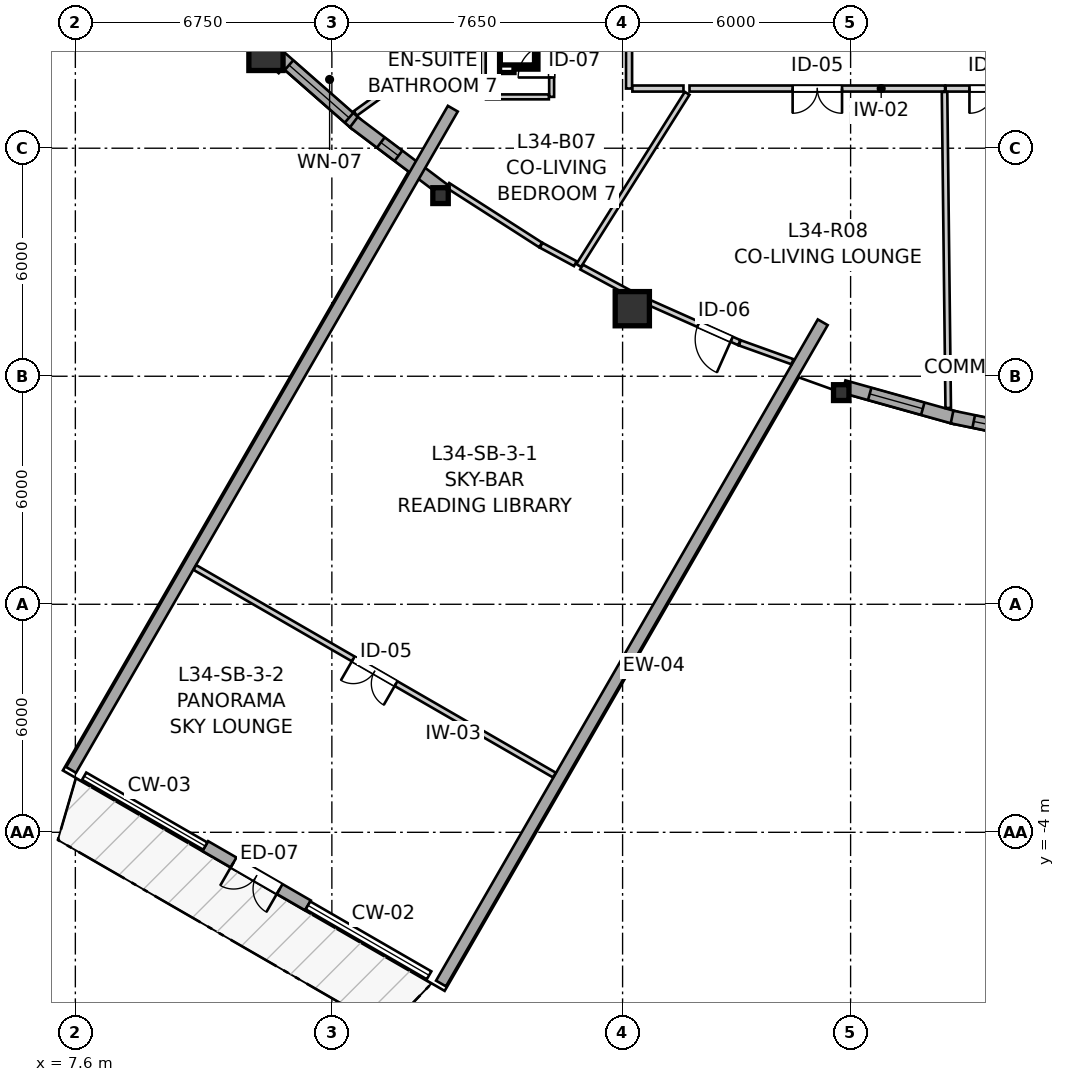
"""IFC4 building model, lengths in metres.
Left out: names, types, materials, properties, quantities, classifications, styles, units other than length and angle.
Written with IfcOpenShell. Run it as: python <this file> out.ifc"""

import sys

from ifc_helpers import new_model, si_unit, direction, frame, frame_2d, origin, origin_2d, place, context, subcontext, project, spatial, rectangle, i_section, extrude, source, transform, mapped, element, fill, save


model = new_model("IFC4")
c1 = context("Model", 3, precision=1e-05, world=origin(), true_north=direction((0.0, 1.0)))
c2 = subcontext(c1, "Body", "Model", "MODEL_VIEW")
j1 = project(units=[si_unit("LENGTHUNIT", "METRE"), si_unit("PLANEANGLEUNIT", "RADIAN")], contexts=[c1])
p1 = place(None, origin())
s1 = spatial("IfcSite", under=j1, at=p1, CompositionType="ELEMENT")
p2 = place(p1, origin())
s2 = spatial("IfcBuilding", under=s1, at=p2, CompositionType="ELEMENT")
p3 = place(p2, frame((0.0, 0.0, 115.2)))
s3 = spatial("IfcBuildingStorey", under=s2, at=p3, CompositionType="ELEMENT", Elevation=115.2)
m1 = source(origin(), c2, "Body", "SweptSolid", [
    extrude(rectangle(XDim=0.9, YDim=0.9, at=origin_2d()), origin(), (0.0, 0.0, 1.0), 2.95),
])
p4 = place(p3, frame((12.616, 16.495, 0.0), z_axis=(0.0, 0.0, 1.0), x_axis=(1.0, 0.0, 0.0)))
e1 = element("IfcColumn", 1, at=p4, inside=s3, PredefinedType="COLUMN", context=c2, shape_type="MappedRepresentation", body=[
    mapped(m1, transform((0.0, 0.0, 0.0), x_axis=(1.0, 0.0, 0.0), y_axis=(0.0, 1.0, 0.0), z_axis=(0.0, 0.0, 1.0), scale=1.0)),
])
m2 = source(origin(), c2, "Body", "SweptSolid", [
    extrude(i_section(OverallWidth=0.406, OverallDepth=0.416, WebThickness=0.027, FlangeThickness=0.044, FilletRadius=0.015, at=origin_2d()), origin(), (0.0, 0.0, 1.0), 2.95),
])
p5 = place(p3, frame((17.209, 12.753, 0.0), z_axis=(0.0, 0.0, 1.0), x_axis=(1.0, 0.0, 0.0)))
e2 = element("IfcColumn", 2, at=p5, inside=s3, PredefinedType="PILASTER", context=c2, shape_type="MappedRepresentation", body=[
    mapped(m2, transform((0.0, 0.0, 0.0), x_axis=(1.0, 0.0, 0.0), y_axis=(0.0, 1.0, 0.0), z_axis=(0.0, 0.0, 1.0), scale=1.0)),
])
p6 = place(p3, frame((22.256, 9.778, 0.0), z_axis=(0.0, 0.0, 1.0), x_axis=(1.0, 0.0, 0.0)))
e3 = element("IfcColumn", 3, at=p6, inside=s3, PredefinedType="COLUMN", context=c2, shape_type="MappedRepresentation", body=[
    mapped(m1, transform((0.0, 0.0, 0.0), x_axis=(1.0, 0.0, 0.0), y_axis=(0.0, 1.0, 0.0), z_axis=(0.0, 0.0, 1.0), scale=1.0)),
])
p7 = place(p3, frame((27.754, 7.569, 0.0), z_axis=(0.0, 0.0, 1.0), x_axis=(1.0, 0.0, 0.0)))
e4 = element("IfcColumn", 4, at=p7, inside=s3, PredefinedType="PILASTER", context=c2, shape_type="MappedRepresentation", body=[
    mapped(m2, transform((0.0, 0.0, 0.0), x_axis=(1.0, 0.0, 0.0), y_axis=(0.0, 1.0, 0.0), z_axis=(0.0, 0.0, 1.0), scale=1.0)),
])
p8 = place(p3, frame((12.901, 16.471, 0.0), z_axis=(0.0, 0.0, 1.0), x_axis=(0.751480442913, -0.659755366722, 0.0)))
e5 = element("IfcWall", 5, at=p8, inside=s3, PredefinedType="SOLIDWALL", context=c2, shape_type="SweptSolid", body=[
    extrude(rectangle(XDim=2.789, YDim=0.34, at=frame_2d((1.395, 0.0))), origin(), (0.0, 0.0, 1.0), 2.48),
])
p9 = place(p8, frame((0.43, 0.0, 0.82)))
e6 = element("IfcOpeningElement", 6, at=p9, cuts=e5, PredefinedType="OPENING", context=c2, shape_type="SweptSolid", body=[
    extrude(rectangle(XDim=2.1, YDim=1.4, at=frame_2d((1.05, 0.7))), frame((0.0, 0.18, 0.0), z_axis=(0.0, -1.0, 0.0), x_axis=(1.0, 0.0, 0.0)), (0.0, 0.0, 1.0), 0.36),
])
p10 = place(p3, frame((14.928, 14.686, 0.0), z_axis=(0.0, 0.0, 1.0), x_axis=(0.798387010211, -0.602144651995, 0.0)))
e7 = element("IfcWall", 7, at=p10, inside=s3, PredefinedType="SOLIDWALL", context=c2, shape_type="SweptSolid", body=[
    extrude(rectangle(XDim=2.966, YDim=0.34, at=frame_2d((1.483, 0.0))), origin(), (0.0, 0.0, 1.0), 2.48),
])
p11 = place(p10, frame((0.891, 0.0, 0.82)))
e8 = element("IfcOpeningElement", 8, at=p11, cuts=e7, PredefinedType="OPENING", context=c2, shape_type="SweptSolid", body=[
    extrude(rectangle(XDim=0.58, YDim=1.35, at=frame_2d((0.29, 0.675))), frame((0.0, 0.18, 0.0), z_axis=(0.0, -1.0, 0.0), x_axis=(1.0, 0.0, 0.0)), (0.0, 0.0, 1.0), 0.36),
])
p12 = place(p3, frame((27.819, 7.728, 0.0), z_axis=(0.0, 0.0, 1.0), x_axis=(0.963032186905, -0.269386352632, 0.0)))
e9 = element("IfcWall", 9, at=p12, inside=s3, PredefinedType="SOLIDWALL", context=c2, shape_type="SweptSolid", body=[
    extrude(rectangle(XDim=3.049, YDim=0.34, at=frame_2d((1.524, 0.0))), origin(), (0.0, 0.0, 1.0), 2.48),
])
p13 = place(p12, frame((0.71, 0.0, 0.82)))
e10 = element("IfcOpeningElement", 10, at=p13, cuts=e9, PredefinedType="OPENING", context=c2, shape_type="SweptSolid", body=[
    extrude(rectangle(XDim=1.45, YDim=1.25, at=frame_2d((0.725, 0.625))), frame((0.0, 0.18, 0.0), z_axis=(0.0, -1.0, 0.0), x_axis=(1.0, 0.0, 0.0)), (0.0, 0.0, 1.0), 0.36),
])
p14 = place(p3, frame((30.67, 6.927, 0.0), z_axis=(0.0, 0.0, 1.0), x_axis=(0.979422345081, -0.201821381317, 0.0)))
e11 = element("IfcWall", 11, at=p14, inside=s3, PredefinedType="SOLIDWALL", context=c2, shape_type="SweptSolid", body=[
    extrude(rectangle(XDim=2.903, YDim=0.34, at=frame_2d((1.452, 0.0))), origin(), (0.0, 0.0, 1.0), 2.48),
])
p15 = place(p14, frame((0.582, 0.0, 0.82)))
e12 = element("IfcOpeningElement", 12, at=p15, cuts=e11, PredefinedType="OPENING", context=c2, shape_type="SweptSolid", body=[
    extrude(rectangle(XDim=1.75, YDim=1.3, at=frame_2d((0.875, 0.65))), frame((0.0, 0.18, 0.0), z_axis=(0.0, -1.0, 0.0), x_axis=(1.0, 0.0, 0.0)), (0.0, 0.0, 1.0), 0.36),
])
p16 = place(p3, frame((27.267, 9.42, 0.0), z_axis=(0.0, 0.0, 1.0), x_axis=(-0.500001212782, -0.866024703583, 0.0)))
e13 = element("IfcWall", 13, at=p16, inside=s3, PredefinedType="SOLIDWALL", context=c2, shape_type="SweptSolid", body=[
    extrude(rectangle(XDim=20.09, YDim=0.3, at=frame_2d((10.045, 0.0))), origin(), (0.0, 0.0, 1.0), 2.13),
])
p17 = place(p3, frame((17.533, 15.04, 0.0), z_axis=(0.0, 0.0, 1.0), x_axis=(-0.499995950774, -0.866027741594, 0.0)))
e14 = element("IfcWall", 14, at=p17, inside=s3, PredefinedType="SOLIDWALL", context=c2, shape_type="SweptSolid", body=[
    extrude(rectangle(XDim=20.091, YDim=0.3, at=frame_2d((10.045, 0.0))), origin(), (0.0, 0.0, 1.0), 2.13),
])
p18 = place(p3, frame((13.721, -5.923, 0.0), z_axis=(0.0, 0.0, 1.0), x_axis=(-0.866009661879, 0.500027264788, 0.0)))
e15 = element("IfcWall", 15, at=p18, inside=s3, PredefinedType="SOLIDWALL", context=c2, shape_type="SweptSolid", body=[
    extrude(rectangle(XDim=3.12, YDim=0.3, at=frame_2d((1.56, 0.0))), origin(), (0.0, 0.0, 1.0), 2.3),
])
p19 = place(p18, frame((0.86, 0.0, 0.0)))
e16 = element("IfcOpeningElement", 16, at=p19, cuts=e15, PredefinedType="OPENING", context=c2, shape_type="SweptSolid", body=[
    extrude(rectangle(XDim=1.4, YDim=2.15, at=frame_2d((0.7, 1.075))), frame((0.0, 0.16, 0.0), z_axis=(0.0, -1.0, 0.0), x_axis=(1.0, 0.0, 0.0)), (0.0, 0.0, 1.0), 0.32),
])
p20 = place(p3, frame((20.206, -2.494, 0.0), z_axis=(0.0, 0.0, 1.0), x_axis=(-0.866034115916, 0.499984909842, 0.0)))
e17 = element("IfcWall", 17, at=p20, inside=s3, PredefinedType="PARTITIONING", context=c2, shape_type="SweptSolid", body=[
    extrude(rectangle(XDim=10.924, YDim=0.145, at=frame_2d((5.462, 0.0))), origin(), (0.0, 0.0, 1.0), 2.383),
])
p21 = place(p20, frame((4.812, 0.0, 0.0)))
e18 = element("IfcOpeningElement", 18, at=p21, cuts=e17, PredefinedType="OPENING", context=c2, shape_type="SweptSolid", body=[
    extrude(rectangle(XDim=1.3, YDim=2.1, at=frame_2d((0.65, 1.05))), frame((0.0, 0.083, 0.0), z_axis=(0.0, -1.0, 0.0), x_axis=(1.0, 0.0, 0.0)), (0.0, 0.0, 1.0), 0.165),
])
p22 = place(p3, frame((30.486, 15.57, 0.0), z_axis=(0.0, 0.0, 1.0), x_axis=(-1.0, 0.0, 0.0)))
e19 = element("IfcWall", 19, at=p22, inside=s3, PredefinedType="PARTITIONING", context=c2, shape_type="SweptSolid", body=[
    extrude(rectangle(XDim=6.725, YDim=0.16, at=frame_2d((3.363, 0.0))), origin(), (0.0, 0.0, 1.0), 2.95),
])
p23 = place(p22, frame((2.711, 0.0, 0.0)))
e20 = element("IfcOpeningElement", 20, at=p23, cuts=e19, PredefinedType="OPENING", context=c2, shape_type="SweptSolid", body=[
    extrude(rectangle(XDim=1.3, YDim=2.1, at=frame_2d((0.65, 1.05))), frame((0.0, 0.09, 0.0), z_axis=(0.0, -1.0, 0.0), x_axis=(1.0, 0.0, 0.0)), (0.0, 0.0, 1.0), 0.18),
])
p24 = place(p3, frame((22.17, 15.57, 0.0), z_axis=(0.0, 0.0, 1.0), x_axis=(0.0, 1.0, 0.0)))
e21 = element("IfcWall", 21, at=p24, inside=s3, PredefinedType="PARTITIONING", context=c2, shape_type="SweptSolid", body=[
    extrude(rectangle(XDim=4.555, YDim=0.16, at=frame_2d((2.277, 0.0))), origin(), (0.0, 0.0, 1.0), 2.95),
])
p25 = place(p24, frame((1.808, 0.0, 0.0)))
e22 = element("IfcOpeningElement", 22, at=p25, cuts=e21, PredefinedType="OPENING", context=c2, shape_type="SweptSolid", body=[
    extrude(rectangle(XDim=0.92, YDim=2.1, at=frame_2d((0.46, 1.05))), frame((0.0, 0.09, 0.0), z_axis=(0.0, -1.0, 0.0), x_axis=(1.0, 0.0, 0.0)), (0.0, 0.0, 1.0), 0.18),
])
p26 = place(p3, frame((25.071, 8.884, 0.0), z_axis=(0.0, 0.0, 1.0), x_axis=(-0.913404708383, 0.407052623997, 0.0)))
e23 = element("IfcWall", 23, at=p26, inside=s3, PredefinedType="PARTITIONING", context=c2, shape_type="SweptSolid", body=[
    extrude(rectangle(XDim=2.923, YDim=0.145, at=frame_2d((1.462, 0.0))), origin(), (0.0, 0.0, 1.0), 2.468),
])
p27 = place(p26, frame((0.22, 0.0, 0.0)))
e24 = element("IfcOpeningElement", 24, at=p27, cuts=e23, PredefinedType="OPENING", context=c2, shape_type="SweptSolid", body=[
    extrude(rectangle(XDim=0.96, YDim=2.1, at=frame_2d((0.48, 1.05))), frame((0.0, 0.083, 0.0), z_axis=(0.0, -1.0, 0.0), x_axis=(1.0, 0.0, 0.0)), (0.0, 0.0, 1.0), 0.165),
])
p28 = place(p3, frame((33.099, 15.57, 0.0), z_axis=(0.0, 0.0, 1.0), x_axis=(-1.0, 0.0, 0.0)))
e25 = element("IfcWall", 25, at=p28, inside=s3, PredefinedType="PARTITIONING", context=c2, shape_type="SweptSolid", body=[
    extrude(rectangle(XDim=2.598, YDim=0.16, at=frame_2d((1.299, 0.0))), origin(), (0.0, 0.0, 1.0), 2.95),
])
p29 = place(p28, frame((0.671, 0.0, 0.0)))
e26 = element("IfcOpeningElement", 26, at=p29, cuts=e25, PredefinedType="OPENING", context=c2, shape_type="SweptSolid", body=[
    extrude(rectangle(XDim=1.3, YDim=2.1, at=frame_2d((0.65, 1.05))), frame((0.0, 0.09, 0.0), z_axis=(0.0, -1.0, 0.0), x_axis=(1.0, 0.0, 0.0)), (0.0, 0.0, 1.0), 0.18),
])
p30 = place(p3, frame((20.133, 15.351, 0.0), z_axis=(0.0, 0.0, 1.0), x_axis=(0.0, 1.0, 0.0)))
e27 = element("IfcWall", 27, at=p30, inside=s3, PredefinedType="PARTITIONING", context=c2, shape_type="SweptSolid", body=[
    extrude(rectangle(XDim=1.9, YDim=0.13, at=frame_2d((0.95, 0.0))), origin(), (0.0, 0.0, 1.0), 2.95),
])
p31 = place(p30, frame((0.51, 0.0, 0.0)))
e28 = element("IfcOpeningElement", 28, at=p31, cuts=e27, PredefinedType="OPENING", context=c2, shape_type="SweptSolid", body=[
    extrude(rectangle(XDim=0.88, YDim=2.05, at=frame_2d((0.44, 1.025))), frame((0.0, 0.075, 0.0), z_axis=(0.0, -1.0, 0.0), x_axis=(1.0, 0.0, 0.0)), (0.0, 0.0, 1.0), 0.15),
])
p32 = place(p3, frame((14.966, 14.915, 0.0), z_axis=(0.0, 0.0, 1.0), x_axis=(0.811310715309, 0.584615192434, 0.0)))
e29 = element("IfcWall", 29, at=p32, inside=s3, PredefinedType="PARTITIONING", context=c2, shape_type="SweptSolid", body=[
    extrude(rectangle(XDim=8.72, YDim=0.145, at=frame_2d((4.36, 0.0))), origin(), (0.0, 0.0, 1.0), 2.118),
])
p33 = place(p3, frame((30.472, 15.481, 0.0), z_axis=(0.0, 0.0, 1.0), x_axis=(0.011623708307, -0.999932442421, 0.0)))
e30 = element("IfcWall", 30, at=p33, inside=s3, PredefinedType="PARTITIONING", context=c2, shape_type="SweptSolid", body=[
    extrude(rectangle(XDim=8.317, YDim=0.145, at=frame_2d((4.159, 0.0))), origin(), (0.0, 0.0, 1.0), 2.95),
])
p34 = place(p3, frame((20.845, 10.914, 0.0), z_axis=(0.0, 0.0, 1.0), x_axis=(0.533007953382, 0.846110230189, 0.0)))
e31 = element("IfcWall", 31, at=p34, inside=s3, PredefinedType="PARTITIONING", context=c2, shape_type="SweptSolid", body=[
    extrude(rectangle(XDim=5.354, YDim=0.145, at=frame_2d((2.677, 0.0))), origin(), (0.0, 0.0, 1.0), 2.95),
])
p35 = place(p3, frame((17.398, 13.024, 0.0), z_axis=(0.0, 0.0, 1.0), x_axis=(0.841590343852, -0.540116369994, 0.0)))
e32 = element("IfcWall", 32, at=p35, inside=s3, PredefinedType="PARTITIONING", context=c2, shape_type="SweptSolid", body=[
    extrude(rectangle(XDim=2.906, YDim=0.145, at=frame_2d((1.453, 0.0))), origin(), (0.0, 0.0, 1.0), 2.468),
])
p36 = place(p3, frame((18.333, 15.351, 0.0), z_axis=(0.0, 0.0, 1.0), x_axis=(0.0, 1.0, 0.0)))
e33 = element("IfcWall", 33, at=p36, inside=s3, PredefinedType="PARTITIONING", context=c2, shape_type="SweptSolid", body=[
    extrude(rectangle(XDim=1.756, YDim=0.13, at=frame_2d((0.878, 0.0))), origin(), (0.0, 0.0, 1.0), 2.95),
])
p37 = place(p3, frame((18.406, 15.351, 0.0), z_axis=(0.0, 0.0, 1.0), x_axis=(1.0, 0.0, 0.0)))
e34 = element("IfcWall", 34, at=p37, inside=s3, PredefinedType="PARTITIONING", context=c2, shape_type="SweptSolid", body=[
    extrude(rectangle(XDim=1.654, YDim=0.13, at=frame_2d((0.827, 0.0))), origin(), (0.0, 0.0, 1.0), 2.95),
])
p38 = place(p3, frame((20.92, 10.873, 0.0), z_axis=(0.0, 0.0, 1.0), x_axis=(0.879929881444, -0.475103571595, 0.0)))
e35 = element("IfcWall", 35, at=p38, inside=s3, PredefinedType="PARTITIONING", context=c2, shape_type="SweptSolid", body=[
    extrude(rectangle(XDim=1.667, YDim=0.145, at=frame_2d((0.834, 0.0))), origin(), (0.0, 0.0, 1.0), 2.468),
])
p39 = place(p3, frame((22.258, 15.57, 0.0), z_axis=(0.0, 0.0, 1.0), x_axis=(1.0, 0.0, 0.0)))
e36 = element("IfcWall", 36, at=p39, inside=s3, PredefinedType="PARTITIONING", context=c2, shape_type="SweptSolid", body=[
    extrude(rectangle(XDim=1.344, YDim=0.16, at=frame_2d((0.672, 0.0))), origin(), (0.0, 0.0, 1.0), 2.95),
])
p40 = place(p3, frame((25.085, 8.879, 0.0), z_axis=(0.0, 0.0, 1.0), x_axis=(0.941166260093, -0.337943887151, 0.0)))
e37 = element("IfcWall", 37, at=p40, inside=s3, PredefinedType="PARTITIONING", context=c2, shape_type="SweptSolid", body=[
    extrude(rectangle(XDim=1.472, YDim=0.145, at=frame_2d((0.736, 0.0))), origin(), (0.0, 0.0, 1.0), 2.468),
])
p41 = place(p3, frame((19.857, 11.447, 0.0), z_axis=(0.0, 0.0, 1.0), x_axis=(0.8800411893, -0.474897362738, 0.0)))
e38 = element("IfcWall", 38, at=p41, inside=s3, PredefinedType="PARTITIONING", context=c2, shape_type="SweptSolid", body=[
    extrude(rectangle(XDim=1.022, YDim=0.145, at=frame_2d((0.511, 0.0))), origin(), (0.0, 0.0, 1.0), 2.468),
])
m3 = source(origin(), c2, "Body", "SweptSolid", [
    extrude(rectangle(XDim=2.1, YDim=1.4, at=frame_2d((1.05, 0.7))), frame((0.0, 0.03, 0.0), z_axis=(0.0, -1.0, 0.0), x_axis=(1.0, 0.0, 0.0)), (0.0, 0.0, 1.0), 0.06),
])
p42 = place(p9, origin())
e39 = element("IfcWindow", 39, at=p42, inside=s3, PartitioningType="SINGLE_PANEL", PredefinedType="WINDOW", context=c2, shape_type="MappedRepresentation", body=[
    mapped(m3, transform((0.0, 0.0, 0.0), x_axis=(1.0, 0.0, 0.0), y_axis=(0.0, 1.0, 0.0), z_axis=(0.0, 0.0, 1.0), scale=1.0)),
])
fill(e6, e39)
m4 = source(origin(), c2, "Body", "SweptSolid", [
    extrude(rectangle(XDim=1.45, YDim=1.25, at=frame_2d((0.725, 0.625))), frame((0.0, 0.03, 0.0), z_axis=(0.0, -1.0, 0.0), x_axis=(1.0, 0.0, 0.0)), (0.0, 0.0, 1.0), 0.06),
])
p43 = place(p13, origin())
e40 = element("IfcWindow", 40, at=p43, inside=s3, PartitioningType="SINGLE_PANEL", PredefinedType="WINDOW", context=c2, shape_type="MappedRepresentation", body=[
    mapped(m4, transform((0.0, 0.0, 0.0), x_axis=(1.0, 0.0, 0.0), y_axis=(0.0, 1.0, 0.0), z_axis=(0.0, 0.0, 1.0), scale=1.0)),
])
fill(e10, e40)
m5 = source(origin(), c2, "Body", "SweptSolid", [
    extrude(rectangle(XDim=1.75, YDim=1.3, at=frame_2d((0.875, 0.65))), frame((0.0, 0.03, 0.0), z_axis=(0.0, -1.0, 0.0), x_axis=(1.0, 0.0, 0.0)), (0.0, 0.0, 1.0), 0.06),
])
p44 = place(p15, origin())
e41 = element("IfcWindow", 41, at=p44, inside=s3, PartitioningType="SINGLE_PANEL", PredefinedType="WINDOW", context=c2, shape_type="MappedRepresentation", body=[
    mapped(m5, transform((0.0, 0.0, 0.0), x_axis=(1.0, 0.0, 0.0), y_axis=(0.0, 1.0, 0.0), z_axis=(0.0, 0.0, 1.0), scale=1.0)),
])
fill(e12, e41)
m6 = source(origin(), c2, "Body", "SweptSolid", [
    extrude(rectangle(XDim=0.58, YDim=1.35, at=frame_2d((0.29, 0.675))), frame((0.0, 0.03, 0.0), z_axis=(0.0, -1.0, 0.0), x_axis=(1.0, 0.0, 0.0)), (0.0, 0.0, 1.0), 0.06),
])
p45 = place(p11, origin())
e42 = element("IfcWindow", 42, at=p45, inside=s3, PartitioningType="SINGLE_PANEL", PredefinedType="WINDOW", context=c2, shape_type="MappedRepresentation", body=[
    mapped(m6, transform((0.0, 0.0, 0.0), x_axis=(1.0, 0.0, 0.0), y_axis=(0.0, 1.0, 0.0), z_axis=(0.0, 0.0, 1.0), scale=1.0)),
])
fill(e8, e42)
m7 = source(origin(), c2, "Body", "SweptSolid", [
    extrude(rectangle(XDim=1.4, YDim=2.15, at=frame_2d((0.7, 1.075))), frame((0.0, 0.025, 0.0), z_axis=(0.0, -1.0, 0.0), x_axis=(1.0, 0.0, 0.0)), (0.0, 0.0, 1.0), 0.05),
])
p46 = place(p19, origin())
e43 = element("IfcDoor", 43, at=p46, inside=s3, OperationType="DOUBLE_DOOR_SINGLE_SWING", PredefinedType="DOOR", context=c2, shape_type="MappedRepresentation", body=[
    mapped(m7, transform((0.0, 0.0, 0.0), x_axis=(1.0, 0.0, 0.0), y_axis=(0.0, 1.0, 0.0), z_axis=(0.0, 0.0, 1.0), scale=1.0)),
])
fill(e16, e43)
m8 = source(origin(), c2, "Body", "SweptSolid", [
    extrude(rectangle(XDim=1.3, YDim=2.1, at=frame_2d((0.65, 1.05))), frame((0.0, 0.025, 0.0), z_axis=(0.0, -1.0, 0.0), x_axis=(1.0, 0.0, 0.0)), (0.0, 0.0, 1.0), 0.05),
])
p47 = place(p21, origin())
e44 = element("IfcDoor", 44, at=p47, inside=s3, OperationType="DOUBLE_DOOR_SINGLE_SWING", PredefinedType="DOOR", context=c2, shape_type="MappedRepresentation", body=[
    mapped(m8, transform((0.0, 0.0, 0.0), x_axis=(1.0, 0.0, 0.0), y_axis=(0.0, 1.0, 0.0), z_axis=(0.0, 0.0, 1.0), scale=1.0)),
])
fill(e18, e44)
p48 = place(p23, origin())
e45 = element("IfcDoor", 45, at=p48, inside=s3, OperationType="DOUBLE_DOOR_SINGLE_SWING", PredefinedType="DOOR", context=c2, shape_type="MappedRepresentation", body=[
    mapped(m8, transform((0.0, 0.0, 0.0), x_axis=(1.0, 0.0, 0.0), y_axis=(0.0, 1.0, 0.0), z_axis=(0.0, 0.0, 1.0), scale=1.0)),
])
fill(e20, e45)
m9 = source(origin(), c2, "Body", "SweptSolid", [
    extrude(rectangle(XDim=0.96, YDim=2.1, at=frame_2d((0.48, 1.05))), frame((0.0, 0.025, 0.0), z_axis=(0.0, -1.0, 0.0), x_axis=(1.0, 0.0, 0.0)), (0.0, 0.0, 1.0), 0.05),
])
p49 = place(p27, origin())
e46 = element("IfcDoor", 46, at=p49, inside=s3, OperationType="SINGLE_SWING_LEFT", PredefinedType="DOOR", context=c2, shape_type="MappedRepresentation", body=[
    mapped(m9, transform((0.0, 0.0, 0.0), x_axis=(1.0, 0.0, 0.0), y_axis=(0.0, 1.0, 0.0), z_axis=(0.0, 0.0, 1.0), scale=1.0)),
])
fill(e24, e46)
p50 = place(p29, origin())
e47 = element("IfcDoor", 47, at=p50, inside=s3, OperationType="DOUBLE_DOOR_SINGLE_SWING", PredefinedType="DOOR", context=c2, shape_type="MappedRepresentation", body=[
    mapped(m8, transform((0.0, 0.0, 0.0), x_axis=(1.0, 0.0, 0.0), y_axis=(0.0, 1.0, 0.0), z_axis=(0.0, 0.0, 1.0), scale=1.0)),
])
fill(e26, e47)
m10 = source(origin(), c2, "Body", "SweptSolid", [
    extrude(rectangle(XDim=0.88, YDim=2.05, at=frame_2d((0.44, 1.025))), frame((0.0, 0.025, 0.0), z_axis=(0.0, -1.0, 0.0), x_axis=(1.0, 0.0, 0.0)), (0.0, 0.0, 1.0), 0.05),
])
p51 = place(p31, origin())
e48 = element("IfcDoor", 48, at=p51, inside=s3, OperationType="SINGLE_SWING_LEFT", PredefinedType="DOOR", context=c2, shape_type="MappedRepresentation", body=[
    mapped(m10, transform((0.0, 0.0, 0.0), x_axis=(1.0, 0.0, 0.0), y_axis=(0.0, 1.0, 0.0), z_axis=(0.0, 0.0, 1.0), scale=1.0)),
])
fill(e28, e48)
save(model, sys.argv[1])
